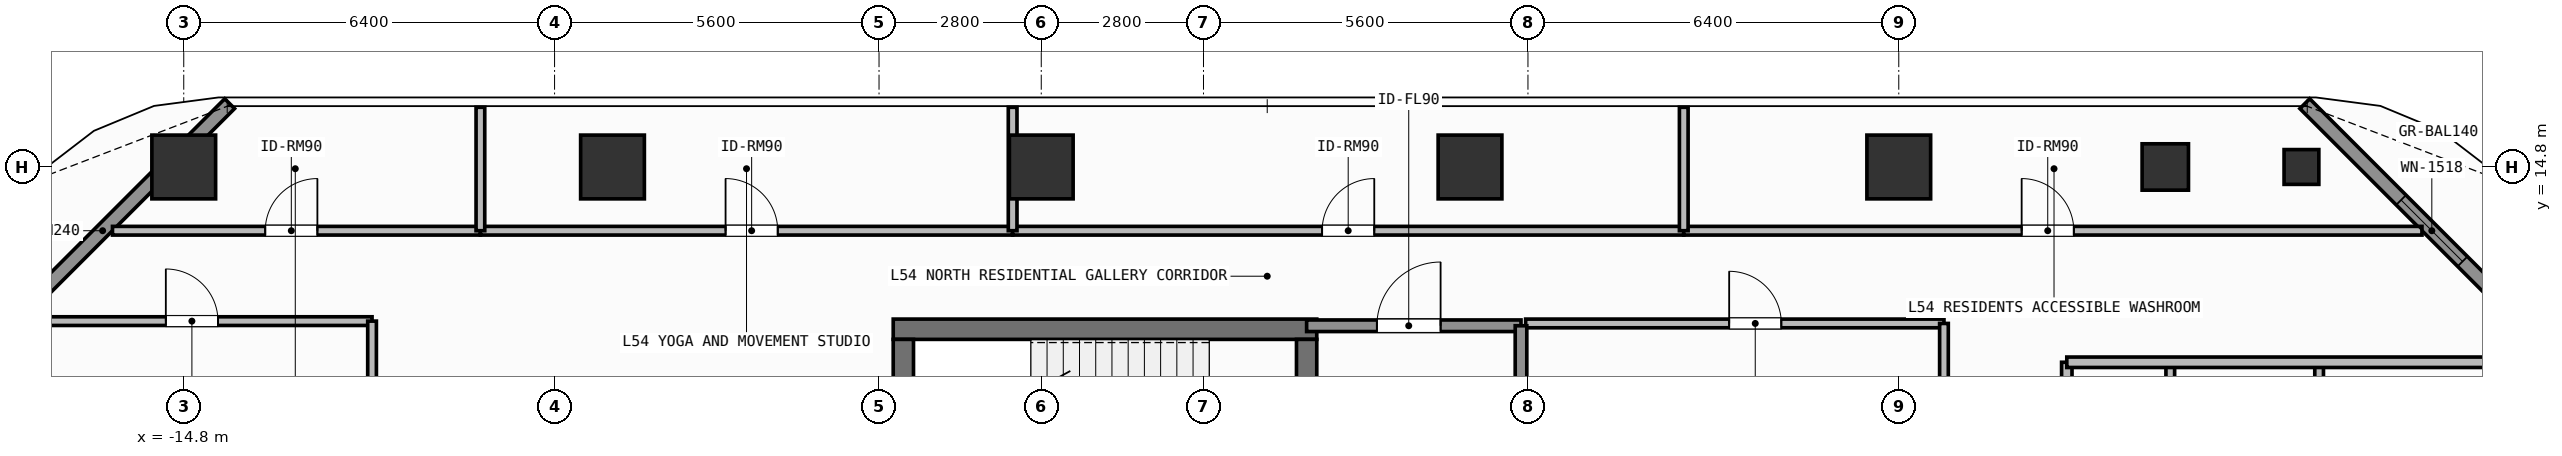
"""IFC4 building model, lengths in metres.
Left out: names, types, materials, properties, quantities, classifications, styles, units other than length and angle.
Written with IfcOpenShell. Run it as: python <this file> out.ifc"""

import sys

from ifc_helpers import new_model, si_unit, direction, frame, frame_2d, origin, origin_2d, place, context, subcontext, project, spatial, rectangle, hollow_rectangle, extrude, element, fill, save


model = new_model("IFC4")
c1 = context("Model", 3, precision=1e-05, world=origin(), true_north=direction((0.0, 1.0)))
c2 = subcontext(c1, "Body", "Model", "MODEL_VIEW")
j1 = project(units=[si_unit("LENGTHUNIT", "METRE"), si_unit("PLANEANGLEUNIT", "RADIAN")], contexts=[c1])
p1 = place(None, origin())
s1 = spatial("IfcSite", under=j1, at=p1, CompositionType="ELEMENT")
p2 = place(p1, origin())
s2 = spatial("IfcBuilding", under=s1, at=p2, CompositionType="ELEMENT")
p3 = place(p2, frame((0.0, 0.0, 219.6)))
s3 = spatial("IfcBuildingStorey", under=s2, at=p3, CompositionType="ELEMENT", Elevation=219.6)
p4 = place(p3, frame((-2.555, 12.0, 0.0), z_axis=(0.0, 0.0, 1.0), x_axis=(1.0, 0.0, 0.0)))
e1 = element("IfcWall", 1, at=p4, inside=s3, PredefinedType="SHEAR", context=c2, shape_type="SweptSolid", body=[
    extrude(rectangle(XDim=7.31, YDim=0.35, at=frame_2d((3.655, 0.0))), origin(), (0.0, 0.0, 1.0), 3.9),
])
p5 = place(p3, frame((-2.38, 8.9, 0.0), z_axis=(0.0, 0.0, 1.0), x_axis=(0.0, 1.0, 0.0)))
e2 = element("IfcWall", 2, at=p5, inside=s3, PredefinedType="SHEAR", context=c2, shape_type="SweptSolid", body=[
    extrude(rectangle(XDim=2.925, YDim=0.35, at=frame_2d((1.462, 0.0))), origin(), (0.0, 0.0, 1.0), 3.9),
])
p6 = place(p3, frame((4.58, 11.825, 0.0), z_axis=(0.0, 0.0, 1.0), x_axis=(0.0, -1.0, 0.0)))
e3 = element("IfcWall", 3, at=p6, inside=s3, PredefinedType="SHEAR", context=c2, shape_type="SweptSolid", body=[
    extrude(rectangle(XDim=2.925, YDim=0.35, at=frame_2d((1.462, 0.0))), origin(), (0.0, 0.0, 1.0), 3.9),
])
p7 = place(p6, frame((0.913, 0.0, 0.0)))
e4 = element("IfcOpeningElement", 4, at=p7, cuts=e3, PredefinedType="OPENING", context=c2, shape_type="SweptSolid", body=[
    extrude(rectangle(XDim=1.1, YDim=2.15, at=frame_2d((0.55, 1.075))), frame((0.0, 0.185, 0.0), z_axis=(0.0, -1.0, 0.0), x_axis=(1.0, 0.0, 0.0)), (0.0, 0.0, 1.0), 0.37),
])
for number, where, z_axis, x_axis in (
    (5, (-14.8, 14.8, 0.0), (0.0, 0.0, 1.0), (1.0, 0.0, 0.0)),
    (6, (-7.4, 14.8, 0.0), (0.0, 0.0, 1.0), (1.0, 0.0, 0.0)),
    (7, (0.0, 14.8, 0.0), (0.0, 0.0, 1.0), (1.0, 0.0, 0.0)),
    (8, (7.4, 14.8, 0.0), (0.0, 0.0, 1.0), (1.0, 0.0, 0.0)),
    (9, (14.8, 14.8, 0.0), (0.0, 0.0, 1.0), (1.0, 0.0, 0.0)),
):
    element("IfcColumn", number, at=place(p3, frame(where, z_axis=z_axis, x_axis=x_axis)), inside=s3, PredefinedType="COLUMN", context=c2, shape_type="SweptSolid", body=[
        extrude(rectangle(XDim=1.1, YDim=1.1, at=origin_2d()), origin(), (0.0, 0.0, 1.0), 3.9),
    ])
p8 = place(p3, frame((19.4, 14.8, 0.0), z_axis=(0.0, 0.0, 1.0), x_axis=(1.0, 0.0, 0.0)))
e10 = element("IfcColumn", 10, at=p8, inside=s3, PredefinedType="COLUMN", context=c2, shape_type="SweptSolid", body=[
    extrude(hollow_rectangle(XDim=0.8, YDim=0.8, WallThickness=0.036, at=origin_2d()), origin(), (0.0, 0.0, 1.0), 3.9),
])
p9 = place(p3, frame((21.75, 14.8, 0.0), z_axis=(0.0, 0.0, 1.0), x_axis=(1.0, 0.0, 0.0)))
e11 = element("IfcColumn", 11, at=p9, inside=s3, PredefinedType="COLUMN", context=c2, shape_type="SweptSolid", body=[
    extrude(hollow_rectangle(XDim=0.6, YDim=0.6, WallThickness=0.028, at=origin_2d()), origin(), (0.0, 0.0, 1.0), 3.9),
])
p10 = place(p3, frame((-18.392, 11.508, 0.0), z_axis=(0.0, 0.0, 1.0), x_axis=(0.707106781187, 0.707106781187, 0.0)))
e12 = element("IfcWall", 12, at=p10, inside=s3, PredefinedType="SOLIDWALL", context=c2, shape_type="SweptSolid", body=[
    extrude(rectangle(XDim=6.201, YDim=0.24, at=frame_2d((3.101, 0.0))), origin(), (0.0, 0.0, 1.0), 3.68),
])
p11 = place(p3, frame((21.808, 15.892, 0.0), z_axis=(0.0, 0.0, 1.0), x_axis=(0.707106781187, -0.707106781187, 0.0)))
e13 = element("IfcWall", 13, at=p11, inside=s3, PredefinedType="SOLIDWALL", context=c2, shape_type="SweptSolid", body=[
    extrude(rectangle(XDim=6.201, YDim=0.24, at=frame_2d((3.101, 0.0))), origin(), (0.0, 0.0, 1.0), 3.68),
])
p12 = place(p11, frame((2.351, 0.0, 0.8)))
e14 = element("IfcOpeningElement", 14, at=p12, cuts=e13, PredefinedType="OPENING", context=c2, shape_type="SweptSolid", body=[
    extrude(rectangle(XDim=1.5, YDim=1.85, at=frame_2d((0.75, 0.925))), frame((0.0, 0.13, 0.0), z_axis=(0.0, -1.0, 0.0), x_axis=(1.0, 0.0, 0.0)), (0.0, 0.0, 1.0), 0.26),
])
p13 = place(p3, frame((4.58, 12.06, 0.0), z_axis=(0.0, 0.0, 1.0), x_axis=(1.0, 0.0, 0.0)))
e15 = element("IfcWall", 15, at=p13, inside=s3, PredefinedType="SOLIDWALL", context=c2, shape_type="SweptSolid", body=[
    extrude(rectangle(XDim=3.7, YDim=0.2, at=frame_2d((1.85, 0.0))), origin(), (0.0, 0.0, 1.0), 3.68),
])
p14 = place(p13, frame((1.212, 0.0, 0.0)))
e16 = element("IfcOpeningElement", 16, at=p14, cuts=e15, PredefinedType="OPENING", context=c2, shape_type="SweptSolid", body=[
    extrude(rectangle(XDim=1.1, YDim=2.15, at=frame_2d((0.55, 1.075))), frame((0.0, 0.11, 0.0), z_axis=(0.0, -1.0, 0.0), x_axis=(1.0, 0.0, 0.0)), (0.0, 0.0, 1.0), 0.22),
])
p15 = place(p3, frame((8.36, 12.1, 0.0), z_axis=(0.0, 0.0, 1.0), x_axis=(1.0, 0.0, 0.0)))
e17 = element("IfcWall", 17, at=p15, inside=s3, PredefinedType="PARTITIONING", context=c2, shape_type="SweptSolid", body=[
    extrude(rectangle(XDim=7.22, YDim=0.15, at=frame_2d((3.61, 0.0))), origin(), (0.0, 0.0, 1.0), 3.68),
])
p16 = place(p15, frame((3.513, 0.0, 0.0)))
e18 = element("IfcOpeningElement", 18, at=p16, cuts=e17, PredefinedType="OPENING", context=c2, shape_type="SweptSolid", body=[
    extrude(rectangle(XDim=0.9, YDim=2.1, at=frame_2d((0.45, 1.05))), frame((0.0, 0.085, 0.0), z_axis=(0.0, -1.0, 0.0), x_axis=(1.0, 0.0, 0.0)), (0.0, 0.0, 1.0), 0.17),
])
p17 = place(p3, frame((-16.03, 13.7, 0.0), z_axis=(0.0, 0.0, 1.0), x_axis=(1.0, 0.0, 0.0)))
e19 = element("IfcWall", 19, at=p17, inside=s3, PredefinedType="PARTITIONING", context=c2, shape_type="SweptSolid", body=[
    extrude(rectangle(XDim=6.35, YDim=0.15, at=frame_2d((3.175, 0.0))), origin(), (0.0, 0.0, 1.0), 3.68),
])
p18 = place(p17, frame((2.637, 0.0, 0.0)))
e20 = element("IfcOpeningElement", 20, at=p18, cuts=e19, PredefinedType="OPENING", context=c2, shape_type="SweptSolid", body=[
    extrude(rectangle(XDim=0.9, YDim=2.1, at=frame_2d((0.45, 1.05))), frame((0.0, 0.085, 0.0), z_axis=(0.0, -1.0, 0.0), x_axis=(1.0, 0.0, 0.0)), (0.0, 0.0, 1.0), 0.17),
])
p19 = place(p3, frame((-9.68, 13.7, 0.0), z_axis=(0.0, 0.0, 1.0), x_axis=(1.0, 0.0, 0.0)))
e21 = element("IfcWall", 21, at=p19, inside=s3, PredefinedType="PARTITIONING", context=c2, shape_type="SweptSolid", body=[
    extrude(rectangle(XDim=9.186, YDim=0.15, at=frame_2d((4.593, 0.0))), origin(), (0.0, 0.0, 1.0), 3.68),
])
p20 = place(p19, frame((4.231, 0.0, 0.0)))
e22 = element("IfcOpeningElement", 22, at=p20, cuts=e21, PredefinedType="OPENING", context=c2, shape_type="SweptSolid", body=[
    extrude(rectangle(XDim=0.9, YDim=2.1, at=frame_2d((0.45, 1.05))), frame((0.0, 0.085, 0.0), z_axis=(0.0, -1.0, 0.0), x_axis=(1.0, 0.0, 0.0)), (0.0, 0.0, 1.0), 0.17),
])
p21 = place(p3, frame((-0.494, 13.7, 0.0), z_axis=(0.0, 0.0, 1.0), x_axis=(1.0, 0.0, 0.0)))
e23 = element("IfcWall", 23, at=p21, inside=s3, PredefinedType="PARTITIONING", context=c2, shape_type="SweptSolid", body=[
    extrude(rectangle(XDim=11.583, YDim=0.15, at=frame_2d((5.792, 0.0))), origin(), (0.0, 0.0, 1.0), 3.68),
])
p22 = place(p21, frame((5.342, 0.0, 0.0)))
e24 = element("IfcOpeningElement", 24, at=p22, cuts=e23, PredefinedType="OPENING", context=c2, shape_type="SweptSolid", body=[
    extrude(rectangle(XDim=0.9, YDim=2.1, at=frame_2d((0.45, 1.05))), frame((0.0, 0.085, 0.0), z_axis=(0.0, -1.0, 0.0), x_axis=(1.0, 0.0, 0.0)), (0.0, 0.0, 1.0), 0.17),
])
p23 = place(p3, frame((11.089, 13.7, 0.0), z_axis=(0.0, 0.0, 1.0), x_axis=(1.0, 0.0, 0.0)))
e25 = element("IfcWall", 25, at=p23, inside=s3, PredefinedType="PARTITIONING", context=c2, shape_type="SweptSolid", body=[
    extrude(rectangle(XDim=12.741, YDim=0.15, at=frame_2d((6.371, 0.0))), origin(), (0.0, 0.0, 1.0), 3.68),
])
p24 = place(p23, frame((5.832, 0.0, 0.0)))
e26 = element("IfcOpeningElement", 26, at=p24, cuts=e25, PredefinedType="OPENING", context=c2, shape_type="SweptSolid", body=[
    extrude(rectangle(XDim=0.9, YDim=2.1, at=frame_2d((0.45, 1.05))), frame((0.0, 0.085, 0.0), z_axis=(0.0, -1.0, 0.0), x_axis=(1.0, 0.0, 0.0)), (0.0, 0.0, 1.0), 0.17),
])
p25 = place(p3, frame((-17.59, 12.14, 0.0), z_axis=(0.0, 0.0, 1.0), x_axis=(1.0, 0.0, 0.0)))
e27 = element("IfcWall", 27, at=p25, inside=s3, PredefinedType="PARTITIONING", context=c2, shape_type="SweptSolid", body=[
    extrude(rectangle(XDim=6.04, YDim=0.15, at=frame_2d((3.02, 0.0))), origin(), (0.0, 0.0, 1.0), 3.68),
])
p26 = place(p25, frame((2.481, 0.0, 0.0)))
e28 = element("IfcOpeningElement", 28, at=p26, cuts=e27, PredefinedType="OPENING", context=c2, shape_type="SweptSolid", body=[
    extrude(rectangle(XDim=0.9, YDim=2.1, at=frame_2d((0.45, 1.05))), frame((0.0, 0.085, 0.0), z_axis=(0.0, -1.0, 0.0), x_axis=(1.0, 0.0, 0.0)), (0.0, 0.0, 1.0), 0.17),
])
p27 = place(p3, frame((17.7, -12.12, 0.0), z_axis=(0.0, 0.0, 1.0), x_axis=(0.0, 1.0, 0.0)))
e29 = element("IfcWall", 29, at=p27, inside=s3, PredefinedType="PARTITIONING", context=c2, shape_type="SweptSolid", body=[
    extrude(rectangle(XDim=23.55, YDim=0.18, at=frame_2d((11.775, 0.0))), origin(), (0.0, 0.0, 1.0), 3.68),
])
p28 = place(p27, frame((11.454, 0.0, 0.0)))
e30 = element("IfcOpeningElement", 30, at=p28, cuts=e29, PredefinedType="OPENING", context=c2, shape_type="SweptSolid", body=[
    extrude(rectangle(XDim=1.0, YDim=2.2, at=frame_2d((0.5, 1.1))), frame((0.0, 0.1, 0.0), z_axis=(0.0, -1.0, 0.0), x_axis=(1.0, 0.0, 0.0)), (0.0, 0.0, 1.0), 0.2),
])
p29 = place(p3, frame((8.28, 8.8, 0.0), z_axis=(0.0, 0.0, 1.0), x_axis=(0.0, 1.0, 0.0)))
e31 = element("IfcWall", 31, at=p29, inside=s3, PredefinedType="SOLIDWALL", context=c2, shape_type="SweptSolid", body=[
    extrude(rectangle(XDim=3.26, YDim=0.2, at=frame_2d((1.63, 0.0))), origin(), (0.0, 0.0, 1.0), 3.68),
])
p30 = place(p3, frame((15.58, 5.85, 0.0), z_axis=(0.0, 0.0, 1.0), x_axis=(0.0, 1.0, 0.0)))
e32 = element("IfcWall", 32, at=p30, inside=s3, PredefinedType="PARTITIONING", context=c2, shape_type="SweptSolid", body=[
    extrude(rectangle(XDim=6.25, YDim=0.15, at=frame_2d((3.125, 0.0))), origin(), (0.0, 0.0, 1.0), 3.68),
])
for number, where, z_axis, x_axis in (
    (33, (-9.68, 13.7, 0.0), (0.0, 0.0, 1.0), (0.0, 1.0, 0.0)),
    (34, (-0.494, 13.7, 0.0), (0.0, 0.0, 1.0), (0.0, 1.0, 0.0)),
    (35, (11.089, 13.7, 0.0), (0.0, 0.0, 1.0), (0.0, 1.0, 0.0)),
):
    element("IfcWall", number, at=place(p3, frame(where, z_axis=z_axis, x_axis=x_axis)), inside=s3, PredefinedType="PARTITIONING", context=c2, shape_type="SweptSolid", body=[
        extrude(rectangle(XDim=2.13, YDim=0.15, at=frame_2d((1.065, 0.0))), origin(), (0.0, 0.0, 1.0), 3.68),
    ])
p31 = place(p3, frame((-11.55, 4.1, 0.0), z_axis=(0.0, 0.0, 1.0), x_axis=(0.0, 1.0, 0.0)))
e36 = element("IfcWall", 36, at=p31, inside=s3, PredefinedType="PARTITIONING", context=c2, shape_type="SweptSolid", body=[
    extrude(rectangle(XDim=8.04, YDim=0.15, at=frame_2d((4.02, 0.0))), origin(), (0.0, 0.0, 1.0), 3.68),
])
p32 = place(p3, frame((19.486, 5.282, 0.0), z_axis=(0.0, 0.0, 1.0), x_axis=(0.0, 1.0, 0.0)))
e37 = element("IfcWall", 37, at=p32, inside=s3, PredefinedType="PARTITIONING", context=c2, shape_type="SweptSolid", body=[
    extrude(rectangle(XDim=6.148, YDim=0.15, at=frame_2d((3.074, 0.0))), origin(), (0.0, 0.0, 1.0), 3.182),
])
p33 = place(p3, frame((22.055, 5.282, 0.0), z_axis=(0.0, 0.0, 1.0), x_axis=(0.0, 1.0, 0.0)))
e38 = element("IfcWall", 38, at=p33, inside=s3, PredefinedType="PARTITIONING", context=c2, shape_type="SweptSolid", body=[
    extrude(rectangle(XDim=6.148, YDim=0.15, at=frame_2d((3.074, 0.0))), origin(), (0.0, 0.0, 1.0), 3.68),
])
p34 = place(p3, frame((17.7, 11.43, 0.0), z_axis=(0.0, 0.0, 1.0), x_axis=(1.0, 0.0, 0.0)))
e39 = element("IfcWall", 39, at=p34, inside=s3, PredefinedType="PARTITIONING", context=c2, shape_type="SweptSolid", body=[
    extrude(rectangle(XDim=8.43, YDim=0.18, at=frame_2d((4.215, 0.0))), origin(), (0.0, 0.0, 1.0), 3.42),
])
p35 = place(p12, origin())
e40 = element("IfcWindow", 40, at=p35, inside=s3, PartitioningType="SINGLE_PANEL", PredefinedType="WINDOW", context=c2, shape_type="SweptSolid", body=[
    extrude(rectangle(XDim=1.5, YDim=1.85, at=frame_2d((0.75, 0.925))), frame((0.0, 0.03, 0.0), z_axis=(0.0, -1.0, 0.0), x_axis=(1.0, 0.0, 0.0)), (0.0, 0.0, 1.0), 0.06),
])
fill(e14, e40)
p36 = place(p14, origin())
e41 = element("IfcDoor", 41, at=p36, inside=s3, OperationType="SINGLE_SWING_RIGHT", PredefinedType="DOOR", context=c2, shape_type="SweptSolid", body=[
    extrude(rectangle(XDim=1.1, YDim=2.15, at=frame_2d((0.55, 1.075))), frame((0.0, 0.025, 0.0), z_axis=(0.0, -1.0, 0.0), x_axis=(1.0, 0.0, 0.0)), (0.0, 0.0, 1.0), 0.05),
])
fill(e16, e41)
p37 = place(p16, origin())
e42 = element("IfcDoor", 42, at=p37, inside=s3, OperationType="SINGLE_SWING_LEFT", PredefinedType="DOOR", context=c2, shape_type="SweptSolid", body=[
    extrude(rectangle(XDim=0.9, YDim=2.1, at=frame_2d((0.45, 1.05))), frame((0.0, 0.025, 0.0), z_axis=(0.0, -1.0, 0.0), x_axis=(1.0, 0.0, 0.0)), (0.0, 0.0, 1.0), 0.05),
])
fill(e18, e42)
p38 = place(p18, origin())
e43 = element("IfcDoor", 43, at=p38, inside=s3, OperationType="SINGLE_SWING_RIGHT", PredefinedType="DOOR", context=c2, shape_type="SweptSolid", body=[
    extrude(rectangle(XDim=0.9, YDim=2.1, at=frame_2d((0.45, 1.05))), frame((0.0, 0.025, 0.0), z_axis=(0.0, -1.0, 0.0), x_axis=(1.0, 0.0, 0.0)), (0.0, 0.0, 1.0), 0.05),
])
fill(e20, e43)
p39 = place(p20, origin())
e44 = element("IfcDoor", 44, at=p39, inside=s3, OperationType="SINGLE_SWING_LEFT", PredefinedType="DOOR", context=c2, shape_type="SweptSolid", body=[
    extrude(rectangle(XDim=0.9, YDim=2.1, at=frame_2d((0.45, 1.05))), frame((0.0, 0.025, 0.0), z_axis=(0.0, -1.0, 0.0), x_axis=(1.0, 0.0, 0.0)), (0.0, 0.0, 1.0), 0.05),
])
fill(e22, e44)
p40 = place(p22, origin())
e45 = element("IfcDoor", 45, at=p40, inside=s3, OperationType="SINGLE_SWING_RIGHT", PredefinedType="DOOR", context=c2, shape_type="SweptSolid", body=[
    extrude(rectangle(XDim=0.9, YDim=2.1, at=frame_2d((0.45, 1.05))), frame((0.0, 0.025, 0.0), z_axis=(0.0, -1.0, 0.0), x_axis=(1.0, 0.0, 0.0)), (0.0, 0.0, 1.0), 0.05),
])
fill(e24, e45)
p41 = place(p24, origin())
e46 = element("IfcDoor", 46, at=p41, inside=s3, OperationType="SINGLE_SWING_LEFT", PredefinedType="DOOR", context=c2, shape_type="SweptSolid", body=[
    extrude(rectangle(XDim=0.9, YDim=2.1, at=frame_2d((0.45, 1.05))), frame((0.0, 0.025, 0.0), z_axis=(0.0, -1.0, 0.0), x_axis=(1.0, 0.0, 0.0)), (0.0, 0.0, 1.0), 0.05),
])
fill(e26, e46)
p42 = place(p26, origin())
e47 = element("IfcDoor", 47, at=p42, inside=s3, OperationType="SINGLE_SWING_LEFT", PredefinedType="DOOR", context=c2, shape_type="SweptSolid", body=[
    extrude(rectangle(XDim=0.9, YDim=2.1, at=frame_2d((0.45, 1.05))), frame((0.0, 0.025, 0.0), z_axis=(0.0, -1.0, 0.0), x_axis=(1.0, 0.0, 0.0)), (0.0, 0.0, 1.0), 0.05),
])
fill(e28, e47)
save(model, sys.argv[1])
